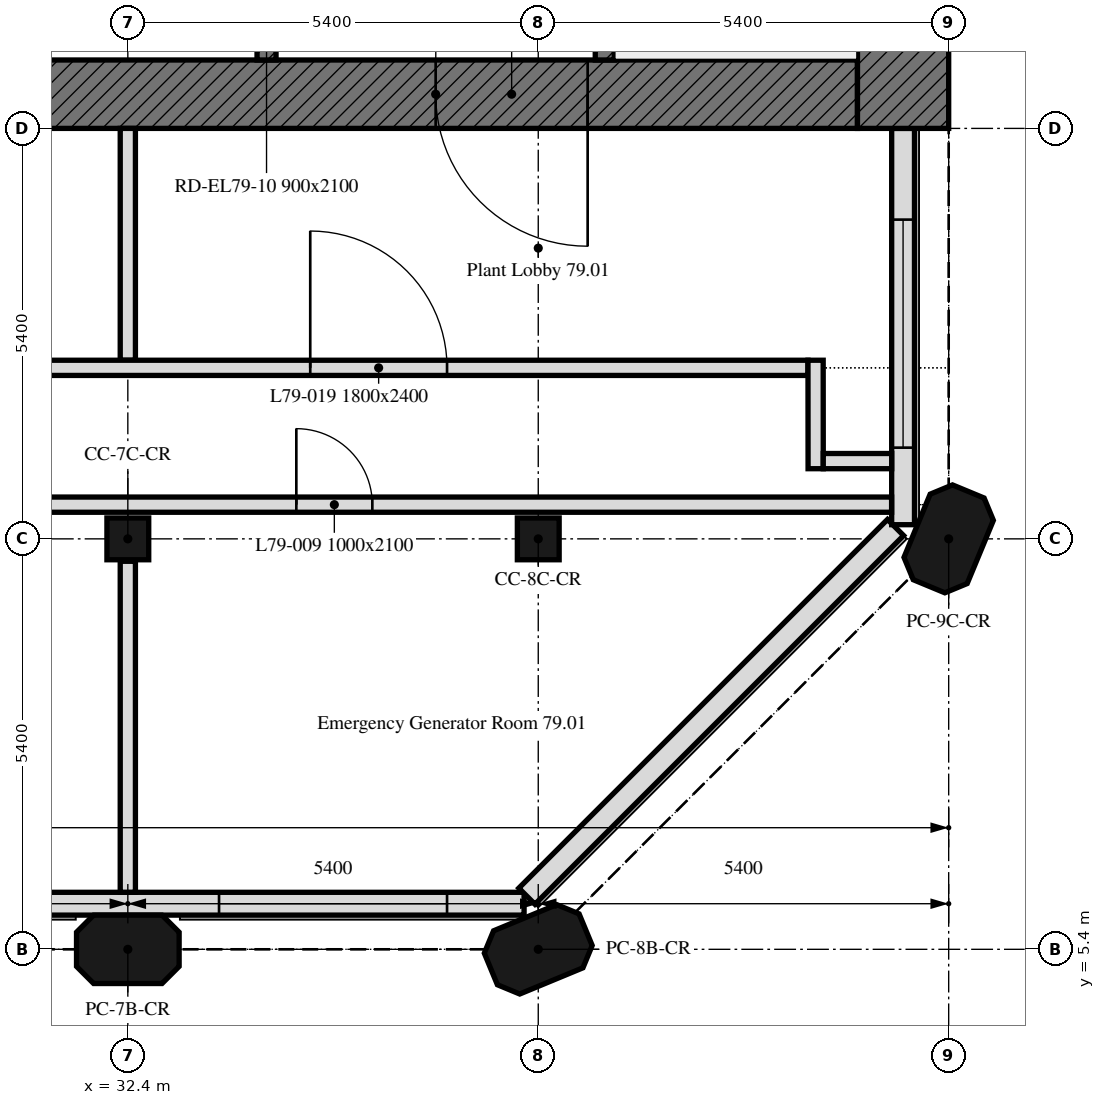
"""IFC4 building model, lengths in metres.
Left out: names, types, materials, properties, quantities, classifications, styles, units other than length and angle.
Written with IfcOpenShell. Run it as: python <this file> out.ifc"""

import sys

from ifc_helpers import new_model, si_unit, direction, frame, frame_2d, origin, origin_2d, place, context, subcontext, project, spatial, polyline, rectangle, outline, extrude, element, fill, save


model = new_model("IFC4")
c1 = context("Model", 3, precision=1e-05, world=origin(), true_north=direction((0.0, 1.0)))
c2 = subcontext(c1, "Body", "Model", "MODEL_VIEW")
j1 = project(units=[si_unit("LENGTHUNIT", "METRE"), si_unit("PLANEANGLEUNIT", "RADIAN")], contexts=[c1])
p1 = place(None, origin())
s1 = spatial("IfcSite", under=j1, at=p1, CompositionType="ELEMENT")
p2 = place(p1, origin())
s2 = spatial("IfcBuilding", under=s1, at=p2, CompositionType="ELEMENT")
p3 = place(p2, frame((0.0, 0.0, 317.2)))
s3 = spatial("IfcBuildingStorey", under=s2, at=p3, CompositionType="ELEMENT", Elevation=317.2)
for number, where, z_axis, x_axis in (
    (1, (32.4, 5.4, 0.0), (0.0, 0.0, 1.0), (1.0, 0.0, 0.0)),
    (2, (37.8, 5.4, 0.0), (0.0, 0.0, 1.0), (0.924, 0.383, 0.0)),
):
    element("IfcColumn", number, at=place(p3, frame(where, z_axis=z_axis, x_axis=x_axis)), inside=s3, PredefinedType="COLUMN", context=c2, shape_type="SweptSolid", body=[
        extrude(outline(polyline([(-0.45, -0.45), (0.45, -0.45), (0.675, -0.225), (0.675, 0.225), (0.45, 0.45), (-0.45, 0.45), (-0.675, 0.225), (-0.675, -0.225), (-0.45, -0.45)])), origin(), (0.0, 0.0, 1.0), 4.2),
    ])
for number, where, z_axis, x_axis in (
    (3, (32.4, 10.8, 0.0), (0.0, 0.0, 1.0), (1.0, 0.0, 0.0)),
    (4, (37.8, 10.8, 0.0), (0.0, 0.0, 1.0), (1.0, 0.0, 0.0)),
):
    element("IfcColumn", number, at=place(p3, frame(where, z_axis=z_axis, x_axis=x_axis)), inside=s3, PredefinedType="COLUMN", context=c2, shape_type="SweptSolid", body=[
        extrude(rectangle(XDim=0.55, YDim=0.55, at=origin_2d()), origin(), (0.0, 0.0, 1.0), 4.2),
    ])
p4 = place(p3, frame((43.2, 10.8, 0.0), z_axis=(0.0, 0.0, 1.0), x_axis=(0.382683432365, 0.923879532511, 0.0)))
e5 = element("IfcColumn", 5, at=p4, inside=s3, PredefinedType="COLUMN", context=c2, shape_type="SweptSolid", body=[
    extrude(outline(polyline([(-0.45, -0.45), (0.45, -0.45), (0.675, -0.225), (0.675, 0.225), (0.45, 0.45), (-0.45, 0.45), (-0.675, 0.225), (-0.675, -0.225), (-0.45, -0.45)])), origin(), (0.0, 0.0, 1.0), 4.2),
])
p5 = place(p3, frame((5.586, 6.0, 0.0), z_axis=(0.0, 0.0, 1.0), x_axis=(1.0, 0.0, 0.0)))
e6 = element("IfcWall", 6, at=p5, inside=s3, PredefinedType="SOLIDWALL", context=c2, shape_type="SweptSolid", body=[
    extrude(outline(polyline([(0.0, 0.0), (32.027, 0.0), (32.027, 4.2), (31.434, 4.2), (30.841, 4.2), (30.248, 4.2), (29.655, 4.2), (29.062, 4.2), (28.469, 4.2), (27.875, 4.2), (27.282, 4.2), (26.689, 4.2), (26.096, 4.2), (25.503, 4.2), (24.91, 4.2), (24.317, 4.2), (23.724, 4.2), (23.131, 4.2), (22.538, 4.2), (21.945, 4.2), (21.352, 4.2), (20.758, 4.2), (20.165, 4.2), (19.572, 4.2), (18.979, 4.2), (18.386, 4.2), (17.793, 4.2), (17.2, 4.2), (16.607, 4.2), (16.014, 4.2), (15.42, 4.2), (14.827, 4.2), (14.234, 4.2), (13.641, 4.2), (13.048, 4.2), (12.455, 4.2), (11.862, 4.2), (11.269, 4.2), (10.676, 4.2), (10.083, 4.2), (9.49, 4.2), (8.896, 4.2), (8.303, 4.2), (7.71, 4.2), (7.117, 4.2), (6.524, 4.2), (5.931, 4.2), (5.338, 4.2), (4.745, 4.2), (4.152, 4.2), (3.559, 4.2), (2.966, 4.2), (2.372, 4.2), (1.779, 4.2), (1.186, 4.2), (0.593, 4.2), (0.0, 4.2), (0.0, 0.0)])), frame((0.0, 0.15, 0.0), z_axis=(0.0, -1.0, 0.0), x_axis=(1.0, 0.0, 0.0)), (0.0, 0.0, 1.0), 0.3),
])
p6 = place(p5, frame((1.014, 0.0, 0.6)))
e7 = element("IfcOpeningElement", 7, at=p6, cuts=e6, PredefinedType="OPENING", context=c2, shape_type="SweptSolid", body=[
    extrude(rectangle(XDim=3.0, YDim=1.8, at=frame_2d((1.5, 0.9))), frame((0.0, 0.16, 0.0), z_axis=(0.0, -1.0, 0.0), x_axis=(1.0, 0.0, 0.0)), (0.0, 0.0, 1.0), 0.32),
])
p7 = place(p5, frame((6.414, 0.0, 0.6)))
e8 = element("IfcOpeningElement", 8, at=p7, cuts=e6, PredefinedType="OPENING", context=c2, shape_type="SweptSolid", body=[
    extrude(rectangle(XDim=3.0, YDim=1.8, at=frame_2d((1.5, 0.9))), frame((0.0, 0.16, 0.0), z_axis=(0.0, -1.0, 0.0), x_axis=(1.0, 0.0, 0.0)), (0.0, 0.0, 1.0), 0.32),
])
p8 = place(p5, frame((11.814, 0.0, 0.6)))
e9 = element("IfcOpeningElement", 9, at=p8, cuts=e6, PredefinedType="OPENING", context=c2, shape_type="SweptSolid", body=[
    extrude(rectangle(XDim=3.0, YDim=1.8, at=frame_2d((1.5, 0.9))), frame((0.0, 0.16, 0.0), z_axis=(0.0, -1.0, 0.0), x_axis=(1.0, 0.0, 0.0)), (0.0, 0.0, 1.0), 0.32),
])
p9 = place(p5, frame((17.214, 0.0, 0.6)))
e10 = element("IfcOpeningElement", 10, at=p9, cuts=e6, PredefinedType="OPENING", context=c2, shape_type="SweptSolid", body=[
    extrude(rectangle(XDim=3.0, YDim=1.8, at=frame_2d((1.5, 0.9))), frame((0.0, 0.16, 0.0), z_axis=(0.0, -1.0, 0.0), x_axis=(1.0, 0.0, 0.0)), (0.0, 0.0, 1.0), 0.32),
])
p10 = place(p5, frame((22.614, 0.0, 0.6)))
e11 = element("IfcOpeningElement", 11, at=p10, cuts=e6, PredefinedType="OPENING", context=c2, shape_type="SweptSolid", body=[
    extrude(rectangle(XDim=3.0, YDim=1.8, at=frame_2d((1.5, 0.9))), frame((0.0, 0.16, 0.0), z_axis=(0.0, -1.0, 0.0), x_axis=(1.0, 0.0, 0.0)), (0.0, 0.0, 1.0), 0.32),
])
p11 = place(p5, frame((28.014, 0.0, 0.6)))
e12 = element("IfcOpeningElement", 12, at=p11, cuts=e6, PredefinedType="OPENING", context=c2, shape_type="SweptSolid", body=[
    extrude(rectangle(XDim=3.0, YDim=1.8, at=frame_2d((1.5, 0.9))), frame((0.0, 0.16, 0.0), z_axis=(0.0, -1.0, 0.0), x_axis=(1.0, 0.0, 0.0)), (0.0, 0.0, 1.0), 0.32),
])
p12 = place(p3, frame((37.65, 6.099, 0.0), z_axis=(0.0, 0.0, 1.0), x_axis=(0.707106781187, 0.707106781187, 0.0)))
e13 = element("IfcWall", 13, at=p12, inside=s3, PredefinedType="SOLIDWALL", context=c2, shape_type="SweptSolid", body=[
    extrude(outline(polyline([(0.0, 0.0), (6.86, 0.0), (6.86, 4.2), (6.288, 4.2), (5.716, 4.2), (5.145, 4.2), (4.573, 4.2), (4.001, 4.2), (3.43, 4.2), (2.858, 4.2), (2.287, 4.2), (1.715, 4.2), (1.143, 4.2), (0.572, 4.2), (0.0, 4.2), (0.0, 0.0)])), frame((0.0, 0.15, 0.0), z_axis=(0.0, -1.0, 0.0), x_axis=(1.0, 0.0, 0.0)), (0.0, 0.0, 1.0), 0.3),
])
p13 = place(p3, frame((42.6, 10.986, 0.0), z_axis=(0.0, 0.0, 1.0), x_axis=(0.0, 1.0, 0.0)))
e14 = element("IfcWall", 14, at=p13, inside=s3, PredefinedType="SOLIDWALL", context=c2, shape_type="SweptSolid", body=[
    extrude(outline(polyline([(0.0, 0.0), (5.214, 0.0), (5.214, 4.2), (4.634, 4.2), (4.055, 4.2), (3.476, 4.2), (2.896, 4.2), (2.317, 4.2), (1.738, 4.2), (1.159, 4.2), (0.579, 4.2), (0.0, 4.2), (0.0, 0.0)])), frame((0.0, 0.15, 0.0), z_axis=(0.0, -1.0, 0.0), x_axis=(1.0, 0.0, 0.0)), (0.0, 0.0, 1.0), 0.3),
])
p14 = place(p13, frame((1.014, 0.0, 0.6)))
e15 = element("IfcOpeningElement", 15, at=p14, cuts=e14, PredefinedType="OPENING", context=c2, shape_type="SweptSolid", body=[
    extrude(rectangle(XDim=3.0, YDim=1.8, at=frame_2d((1.5, 0.9))), frame((0.0, 0.16, 0.0), z_axis=(0.0, -1.0, 0.0), x_axis=(1.0, 0.0, 0.0)), (0.0, 0.0, 1.0), 0.32),
])
p15 = place(p3, frame((42.0, 16.65, 0.0), z_axis=(0.0, 0.0, 1.0), x_axis=(-1.0, 0.0, 0.0)))
e16 = element("IfcWall", 16, at=p15, inside=s3, PredefinedType="SOLIDWALL", context=c2, shape_type="SweptSolid", body=[
    extrude(rectangle(XDim=11.1, YDim=0.9, at=frame_2d((5.55, 0.0))), origin(), (0.0, 0.0, 1.0), 4.2),
])
p16 = place(p15, frame((3.55, 0.0, 0.0)))
e17 = element("IfcOpeningElement", 17, at=p16, cuts=e16, PredefinedType="OPENING", context=c2, shape_type="SweptSolid", body=[
    extrude(rectangle(XDim=2.0, YDim=2.4, at=frame_2d((1.0, 1.2))), frame((0.0, 0.45, 0.0), z_axis=(0.0, -1.0, 0.0), x_axis=(1.0, 0.0, 0.0)), (0.0, 0.0, 1.0), 0.9),
])
p17 = place(p3, frame((42.6, 32.4, 0.0), z_axis=(0.0, 0.0, 1.0), x_axis=(0.0, -1.0, 0.0)))
e18 = element("IfcWall", 18, at=p17, inside=s3, PredefinedType="SOLIDWALL", context=c2, shape_type="SweptSolid", body=[
    extrude(rectangle(XDim=16.2, YDim=1.2, at=frame_2d((8.1, 0.0))), origin(), (0.0, 0.0, 1.0), 4.2),
])
p18 = place(p3, frame((38.675, 17.1, 0.0), z_axis=(0.0, 0.0, 1.0), x_axis=(0.0, 1.0, 0.0)))
e19 = element("IfcWall", 19, at=p18, inside=s3, PredefinedType="SOLIDWALL", context=c2, shape_type="SweptSolid", body=[
    extrude(rectangle(XDim=14.4, YDim=0.25, at=frame_2d((7.2, 0.0))), origin(), (0.0, 0.0, 1.0), 4.2),
])
p19 = place(p18, frame((4.6, 0.0, 0.0)))
e20 = element("IfcOpeningElement", 20, at=p19, cuts=e19, PredefinedType="OPENING", context=c2, shape_type="SweptSolid", body=[
    extrude(rectangle(XDim=1.0, YDim=2.1, at=frame_2d((0.5, 1.05))), frame((0.0, 0.125, 0.0), z_axis=(0.0, -1.0, 0.0), x_axis=(1.0, 0.0, 0.0)), (0.0, 0.0, 1.0), 0.25),
])
p20 = place(p18, frame((7.062, 0.0, 0.0)))
e21 = element("IfcOpeningElement", 21, at=p20, cuts=e19, PredefinedType="OPENING", context=c2, shape_type="SweptSolid", body=[
    extrude(rectangle(XDim=1.2, YDim=2.1, at=frame_2d((0.6, 1.05))), frame((0.0, 0.125, 0.0), z_axis=(0.0, -1.0, 0.0), x_axis=(1.0, 0.0, 0.0)), (0.0, 0.0, 1.0), 0.25),
])
p21 = place(p18, frame((10.41, 0.0, 0.0)))
e22 = element("IfcOpeningElement", 22, at=p21, cuts=e19, PredefinedType="OPENING", context=c2, shape_type="SweptSolid", body=[
    extrude(rectangle(XDim=0.9, YDim=2.1, at=frame_2d((0.45, 1.05))), frame((0.0, 0.125, 0.0), z_axis=(0.0, -1.0, 0.0), x_axis=(1.0, 0.0, 0.0)), (0.0, 0.0, 1.0), 0.25),
])
p22 = place(p18, frame((13.023, 0.0, 0.0)))
e23 = element("IfcOpeningElement", 23, at=p22, cuts=e19, PredefinedType="OPENING", context=c2, shape_type="SweptSolid", body=[
    extrude(rectangle(XDim=0.9, YDim=2.1, at=frame_2d((0.45, 1.05))), frame((0.0, 0.125, 0.0), z_axis=(0.0, -1.0, 0.0), x_axis=(1.0, 0.0, 0.0)), (0.0, 0.0, 1.0), 0.25),
])
p23 = place(p3, frame((34.225, 17.1, 0.0), z_axis=(0.0, 0.0, 1.0), x_axis=(0.0, 1.0, 0.0)))
e24 = element("IfcWall", 24, at=p23, inside=s3, PredefinedType="SOLIDWALL", context=c2, shape_type="SweptSolid", body=[
    extrude(rectangle(XDim=14.4, YDim=0.25, at=frame_2d((7.2, 0.0))), origin(), (0.0, 0.0, 1.0), 4.2),
])
p24 = place(p23, frame((13.15, 0.0, 0.0)))
e25 = element("IfcOpeningElement", 25, at=p24, cuts=e24, PredefinedType="OPENING", context=c2, shape_type="SweptSolid", body=[
    extrude(rectangle(XDim=1.0, YDim=2.1, at=frame_2d((0.5, 1.05))), frame((0.0, 0.125, 0.0), z_axis=(0.0, -1.0, 0.0), x_axis=(1.0, 0.0, 0.0)), (0.0, 0.0, 1.0), 0.25),
])
p25 = place(p23, frame((0.482, 0.0, 0.0)))
e26 = element("IfcOpeningElement", 26, at=p25, cuts=e24, PredefinedType="OPENING", context=c2, shape_type="SweptSolid", body=[
    extrude(rectangle(XDim=0.9, YDim=2.1, at=frame_2d((0.45, 1.05))), frame((0.0, 0.125, 0.0), z_axis=(0.0, -1.0, 0.0), x_axis=(1.0, 0.0, 0.0)), (0.0, 0.0, 1.0), 0.25),
])
p26 = place(p23, frame((2.218, 0.0, 0.0)))
e27 = element("IfcOpeningElement", 27, at=p26, cuts=e24, PredefinedType="OPENING", context=c2, shape_type="SweptSolid", body=[
    extrude(rectangle(XDim=0.9, YDim=2.1, at=frame_2d((0.45, 1.05))), frame((0.0, 0.125, 0.0), z_axis=(0.0, -1.0, 0.0), x_axis=(1.0, 0.0, 0.0)), (0.0, 0.0, 1.0), 0.25),
])
p27 = place(p23, frame((3.71, 0.0, 0.0)))
e28 = element("IfcOpeningElement", 28, at=p27, cuts=e24, PredefinedType="OPENING", context=c2, shape_type="SweptSolid", body=[
    extrude(rectangle(XDim=0.9, YDim=2.1, at=frame_2d((0.45, 1.05))), frame((0.0, 0.125, 0.0), z_axis=(0.0, -1.0, 0.0), x_axis=(1.0, 0.0, 0.0)), (0.0, 0.0, 1.0), 0.25),
])
p28 = place(p23, frame((6.175, 0.0, 0.0)))
e29 = element("IfcOpeningElement", 29, at=p28, cuts=e24, PredefinedType="OPENING", context=c2, shape_type="SweptSolid", body=[
    extrude(rectangle(XDim=0.9, YDim=2.1, at=frame_2d((0.45, 1.05))), frame((0.0, 0.125, 0.0), z_axis=(0.0, -1.0, 0.0), x_axis=(1.0, 0.0, 0.0)), (0.0, 0.0, 1.0), 0.25),
])
p29 = place(p3, frame((32.4, 10.505, 0.0), z_axis=(0.0, 0.0, 1.0), x_axis=(0.0, -1.0, 0.0)))
e30 = element("IfcWall", 30, at=p29, inside=s3, PredefinedType="PARTITIONING", context=c2, shape_type="SweptSolid", body=[
    extrude(rectangle(XDim=4.354, YDim=0.2, at=frame_2d((2.177, 0.0))), origin(), (0.0, 0.0, 1.0), 4.2),
])
p30 = place(p3, frame((0.751, 11.25, 0.0), z_axis=(0.0, 0.0, 1.0), x_axis=(1.0, 0.0, 0.0)))
e31 = element("IfcWall", 31, at=p30, inside=s3, PredefinedType="PARTITIONING", context=c2, shape_type="SweptSolid", body=[
    extrude(rectangle(XDim=41.698, YDim=0.2, at=frame_2d((20.849, 0.0))), origin(), (0.0, 0.0, 1.0), 4.2),
])
p31 = place(p30, frame((33.866, 0.0, 0.0)))
e32 = element("IfcOpeningElement", 32, at=p31, cuts=e31, PredefinedType="OPENING", context=c2, shape_type="SweptSolid", body=[
    extrude(rectangle(XDim=1.0, YDim=2.1, at=frame_2d((0.5, 1.05))), frame((0.0, 0.1, 0.0), z_axis=(0.0, -1.0, 0.0), x_axis=(1.0, 0.0, 0.0)), (0.0, 0.0, 1.0), 0.2),
])
p32 = place(p30, frame((28.449, 0.0, 0.0)))
e33 = element("IfcOpeningElement", 33, at=p32, cuts=e31, PredefinedType="OPENING", context=c2, shape_type="SweptSolid", body=[
    extrude(rectangle(XDim=1.0, YDim=2.1, at=frame_2d((0.5, 1.05))), frame((0.0, 0.1, 0.0), z_axis=(0.0, -1.0, 0.0), x_axis=(1.0, 0.0, 0.0)), (0.0, 0.0, 1.0), 0.2),
])
p33 = place(p30, frame((23.049, 0.0, 0.0)))
e34 = element("IfcOpeningElement", 34, at=p33, cuts=e31, PredefinedType="OPENING", context=c2, shape_type="SweptSolid", body=[
    extrude(rectangle(XDim=1.0, YDim=2.1, at=frame_2d((0.5, 1.05))), frame((0.0, 0.1, 0.0), z_axis=(0.0, -1.0, 0.0), x_axis=(1.0, 0.0, 0.0)), (0.0, 0.0, 1.0), 0.2),
])
p34 = place(p30, frame((17.499, 0.0, 0.0)))
e35 = element("IfcOpeningElement", 35, at=p34, cuts=e31, PredefinedType="OPENING", context=c2, shape_type="SweptSolid", body=[
    extrude(rectangle(XDim=1.0, YDim=2.1, at=frame_2d((0.5, 1.05))), frame((0.0, 0.1, 0.0), z_axis=(0.0, -1.0, 0.0), x_axis=(1.0, 0.0, 0.0)), (0.0, 0.0, 1.0), 0.2),
])
p35 = place(p3, frame((32.4, 13.15, 0.0), z_axis=(0.0, 0.0, 1.0), x_axis=(0.0, 1.0, 0.0)))
e36 = element("IfcWall", 36, at=p35, inside=s3, PredefinedType="PARTITIONING", context=c2, shape_type="SweptSolid", body=[
    extrude(rectangle(XDim=3.05, YDim=0.2, at=frame_2d((1.525, 0.0))), origin(), (0.0, 0.0, 1.0), 4.2),
])
p36 = place(p3, frame((5.3, 13.05, 0.0), z_axis=(0.0, 0.0, 1.0), x_axis=(1.0, 0.0, 0.0)))
e37 = element("IfcWall", 37, at=p36, inside=s3, PredefinedType="PARTITIONING", context=c2, shape_type="SweptSolid", body=[
    extrude(rectangle(XDim=36.049, YDim=0.2, at=frame_2d((18.024, 0.0))), origin(), (0.0, 0.0, 1.0), 4.2),
])
p37 = place(p36, frame((23.9, 0.0, 0.0)))
e38 = element("IfcOpeningElement", 38, at=p37, cuts=e37, PredefinedType="OPENING", context=c2, shape_type="SweptSolid", body=[
    extrude(rectangle(XDim=1.0, YDim=2.1, at=frame_2d((0.5, 1.05))), frame((0.0, 0.1, 0.0), z_axis=(0.0, -1.0, 0.0), x_axis=(1.0, 0.0, 0.0)), (0.0, 0.0, 1.0), 0.2),
])
p38 = place(p36, frame((18.5, 0.0, 0.0)))
e39 = element("IfcOpeningElement", 39, at=p38, cuts=e37, PredefinedType="OPENING", context=c2, shape_type="SweptSolid", body=[
    extrude(rectangle(XDim=1.0, YDim=2.1, at=frame_2d((0.5, 1.05))), frame((0.0, 0.1, 0.0), z_axis=(0.0, -1.0, 0.0), x_axis=(1.0, 0.0, 0.0)), (0.0, 0.0, 1.0), 0.2),
])
p39 = place(p36, frame((13.2, 0.0, 0.0)))
e40 = element("IfcOpeningElement", 40, at=p39, cuts=e37, PredefinedType="OPENING", context=c2, shape_type="SweptSolid", body=[
    extrude(rectangle(XDim=0.8, YDim=2.1, at=frame_2d((0.4, 1.05))), frame((0.0, 0.1, 0.0), z_axis=(0.0, -1.0, 0.0), x_axis=(1.0, 0.0, 0.0)), (0.0, 0.0, 1.0), 0.2),
])
p40 = place(p36, frame((29.5, 0.0, 0.0)))
e41 = element("IfcOpeningElement", 41, at=p40, cuts=e37, PredefinedType="OPENING", context=c2, shape_type="SweptSolid", body=[
    extrude(rectangle(XDim=1.8, YDim=2.4, at=frame_2d((0.9, 1.2))), frame((0.0, 0.1, 0.0), z_axis=(0.0, -1.0, 0.0), x_axis=(1.0, 0.0, 0.0)), (0.0, 0.0, 1.0), 0.2),
])
p41 = place(p36, frame((2.5, 0.0, 0.0)))
e42 = element("IfcOpeningElement", 42, at=p41, cuts=e37, PredefinedType="OPENING", context=c2, shape_type="SweptSolid", body=[
    extrude(rectangle(XDim=1.8, YDim=2.4, at=frame_2d((0.9, 1.2))), frame((0.0, 0.1, 0.0), z_axis=(0.0, -1.0, 0.0), x_axis=(1.0, 0.0, 0.0)), (0.0, 0.0, 1.0), 0.2),
])
p42 = place(p3, frame((41.449, 13.15, 0.0), z_axis=(0.0, 0.0, 1.0), x_axis=(0.00085543168, -0.999999634118, 0.0)))
e43 = element("IfcWall", 43, at=p42, inside=s3, PredefinedType="PARTITIONING", context=c2, shape_type="SweptSolid", body=[
    extrude(rectangle(XDim=1.427, YDim=0.2, at=frame_2d((0.713, 0.0))), origin(), (0.0, 0.0, 1.0), 4.2),
])
p43 = place(p3, frame((41.55, 11.823, 0.0), z_axis=(0.0, 0.0, 1.0), x_axis=(1.0, 0.0, 0.0)))
e44 = element("IfcWall", 44, at=p43, inside=s3, PredefinedType="PARTITIONING", context=c2, shape_type="SweptSolid", body=[
    extrude(rectangle(XDim=0.9, YDim=0.2, at=frame_2d((0.45, 0.0))), origin(), (0.0, 0.0, 1.0), 4.2),
])
p44 = place(p11, origin())
e45 = element("IfcWindow", 45, at=p44, inside=s3, PartitioningType="SINGLE_PANEL", PredefinedType="WINDOW", context=c2, shape_type="SweptSolid", body=[
    extrude(rectangle(XDim=3.0, YDim=1.8, at=frame_2d((1.5, 0.9))), frame((0.0, 0.03, 0.0), z_axis=(0.0, -1.0, 0.0), x_axis=(1.0, 0.0, 0.0)), (0.0, 0.0, 1.0), 0.06),
])
fill(e12, e45)
p45 = place(p14, origin())
e46 = element("IfcWindow", 46, at=p45, inside=s3, PartitioningType="SINGLE_PANEL", PredefinedType="WINDOW", context=c2, shape_type="SweptSolid", body=[
    extrude(rectangle(XDim=3.0, YDim=1.8, at=frame_2d((1.5, 0.9))), frame((0.0, 0.03, 0.0), z_axis=(0.0, -1.0, 0.0), x_axis=(1.0, 0.0, 0.0)), (0.0, 0.0, 1.0), 0.06),
])
fill(e15, e46)
p46 = place(p16, origin())
e47 = element("IfcDoor", 47, at=p46, inside=s3, OperationType="DOUBLE_DOOR_SINGLE_SWING", PredefinedType="DOOR", context=c2, shape_type="SweptSolid", body=[
    extrude(rectangle(XDim=2.0, YDim=2.4, at=frame_2d((1.0, 1.2))), frame((0.0, 0.025, 0.0), z_axis=(0.0, -1.0, 0.0), x_axis=(1.0, 0.0, 0.0)), (0.0, 0.0, 1.0), 0.05),
])
fill(e17, e47)
p47 = place(p31, origin())
e48 = element("IfcDoor", 48, at=p47, inside=s3, OperationType="SINGLE_SWING_RIGHT", PredefinedType="DOOR", context=c2, shape_type="SweptSolid", body=[
    extrude(rectangle(XDim=1.0, YDim=2.1, at=frame_2d((0.5, 1.05))), frame((0.0, 0.025, 0.0), z_axis=(0.0, -1.0, 0.0), x_axis=(1.0, 0.0, 0.0)), (0.0, 0.0, 1.0), 0.05),
])
fill(e32, e48)
p48 = place(p40, origin())
e49 = element("IfcDoor", 49, at=p48, inside=s3, OperationType="DOUBLE_DOOR_SINGLE_SWING", PredefinedType="DOOR", context=c2, shape_type="SweptSolid", body=[
    extrude(rectangle(XDim=1.8, YDim=2.4, at=frame_2d((0.9, 1.2))), frame((0.0, 0.025, 0.0), z_axis=(0.0, -1.0, 0.0), x_axis=(1.0, 0.0, 0.0)), (0.0, 0.0, 1.0), 0.05),
])
fill(e41, e49)
save(model, sys.argv[1])
